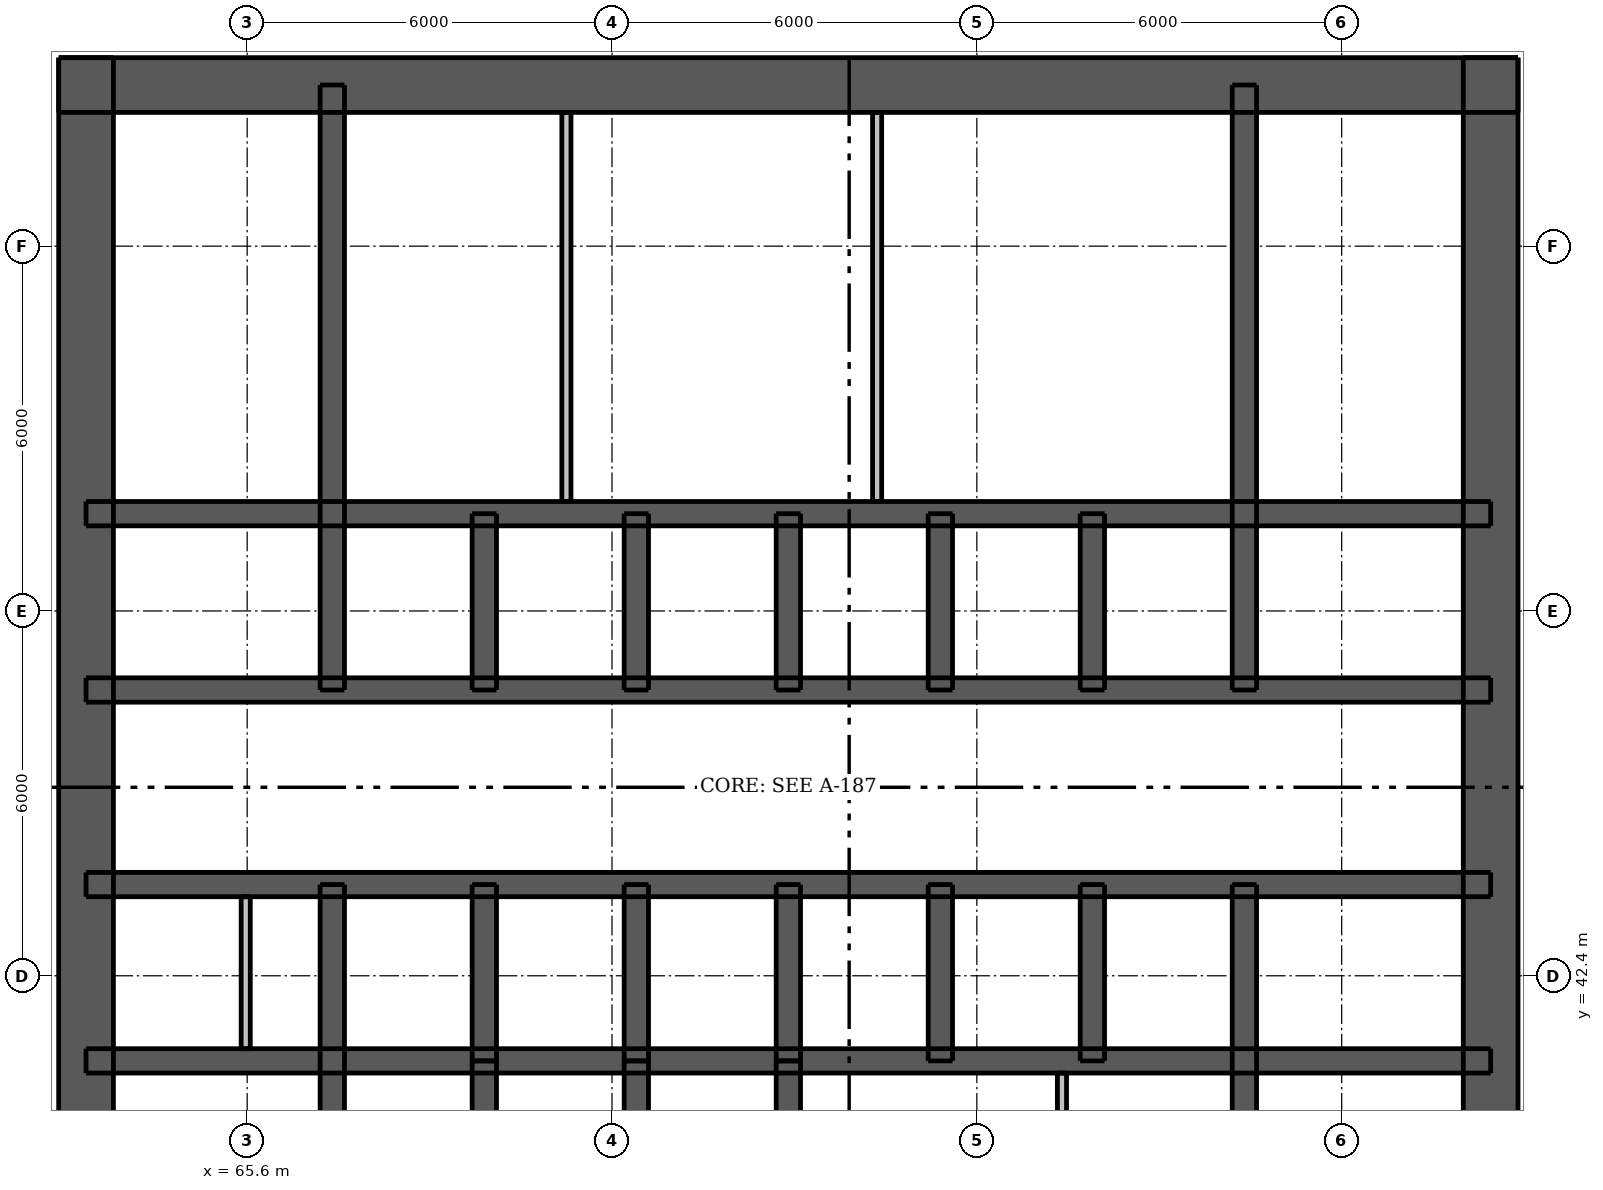
"""IFC4 building model, lengths in metres.
Left out: names, types, materials, properties, quantities, classifications, styles, units other than length and angle.
Written with IfcOpenShell. Run it as: python <this file> out.ifc"""

import sys

from ifc_helpers import new_model, si_unit, direction, frame, frame_2d, origin, place, context, subcontext, project, spatial, rectangle, extrude, element, fill, save


model = new_model("IFC4")
c1 = context("Model", 3, precision=1e-05, world=origin(), true_north=direction((0.0, 1.0)))
c2 = subcontext(c1, "Body", "Model", "MODEL_VIEW")
j1 = project(units=[si_unit("LENGTHUNIT", "METRE"), si_unit("PLANEANGLEUNIT", "RADIAN")], contexts=[c1])
p1 = place(None, origin())
s1 = spatial("IfcSite", under=j1, at=p1, CompositionType="ELEMENT")
p2 = place(p1, origin())
s2 = spatial("IfcBuilding", under=s1, at=p2, CompositionType="ELEMENT")
p3 = place(p2, frame((0.0, 0.0, 49.9)))
s3 = spatial("IfcBuildingStorey", under=s2, at=p3, CompositionType="ELEMENT", Elevation=49.9)
p4 = place(p3, frame((62.5, 57.05, 0.0), z_axis=(0.0, 0.0, 1.0), x_axis=(1.0, 0.0, 0.0)))
e1 = element("IfcWall", 1, at=p4, inside=s3, PredefinedType="SHEAR", context=c2, shape_type="SweptSolid", body=[
    extrude(rectangle(XDim=24.0, YDim=0.9, at=frame_2d((12.0, 0.0))), origin(), (0.0, 0.0, 1.0), 3.05),
])
p5 = place(p4, frame((20.85, 0.0, 0.0)))
e2 = element("IfcOpeningElement", 2, at=p5, cuts=e1, PredefinedType="OPENING", context=c2, shape_type="SweptSolid", body=[
    extrude(rectangle(XDim=1.1, YDim=2.1, at=frame_2d((0.55, 1.05))), frame((0.0, 0.46, 0.0), z_axis=(0.0, -1.0, 0.0), x_axis=(1.0, 0.0, 0.0)), (0.0, 0.0, 1.0), 0.92),
])
p6 = place(p4, frame((2.05, 0.0, 0.0)))
e3 = element("IfcOpeningElement", 3, at=p6, cuts=e1, PredefinedType="OPENING", context=c2, shape_type="SweptSolid", body=[
    extrude(rectangle(XDim=1.1, YDim=2.1, at=frame_2d((0.55, 1.05))), frame((0.0, 0.46, 0.0), z_axis=(0.0, -1.0, 0.0), x_axis=(1.0, 0.0, 0.0)), (0.0, 0.0, 1.0), 0.92),
])
p7 = place(p4, frame((6.075, 0.0, 0.0)))
e4 = element("IfcOpeningElement", 4, at=p7, cuts=e1, PredefinedType="OPENING", context=c2, shape_type="SweptSolid", body=[
    extrude(rectangle(XDim=0.9, YDim=2.1, at=frame_2d((0.45, 1.05))), frame((0.0, 0.46, 0.0), z_axis=(0.0, -1.0, 0.0), x_axis=(1.0, 0.0, 0.0)), (0.0, 0.0, 1.0), 0.92),
])
p8 = place(p4, frame((10.455, 0.0, 0.0)))
e5 = element("IfcOpeningElement", 5, at=p8, cuts=e1, PredefinedType="OPENING", context=c2, shape_type="SweptSolid", body=[
    extrude(rectangle(XDim=0.9, YDim=2.1, at=frame_2d((0.45, 1.05))), frame((0.0, 0.46, 0.0), z_axis=(0.0, -1.0, 0.0), x_axis=(1.0, 0.0, 0.0)), (0.0, 0.0, 1.0), 0.92),
])
p9 = place(p4, frame((15.93, 0.0, 0.0)))
e6 = element("IfcOpeningElement", 6, at=p9, cuts=e1, PredefinedType="OPENING", context=c2, shape_type="SweptSolid", body=[
    extrude(rectangle(XDim=0.9, YDim=2.1, at=frame_2d((0.45, 1.05))), frame((0.0, 0.46, 0.0), z_axis=(0.0, -1.0, 0.0), x_axis=(1.0, 0.0, 0.0)), (0.0, 0.0, 1.0), 0.92),
])
p10 = place(p3, frame((62.95, 33.5, 0.0), z_axis=(0.0, 0.0, 1.0), x_axis=(0.0, 1.0, 0.0)))
e7 = element("IfcWall", 7, at=p10, inside=s3, PredefinedType="SHEAR", context=c2, shape_type="SweptSolid", body=[
    extrude(rectangle(XDim=24.0, YDim=0.9, at=frame_2d((12.0, 0.0))), origin(), (0.0, 0.0, 1.0), 3.05),
])
p11 = place(p10, frame((11.2, 0.0, 0.0)))
e8 = element("IfcOpeningElement", 8, at=p11, cuts=e7, PredefinedType="OPENING", context=c2, shape_type="SweptSolid", body=[
    extrude(rectangle(XDim=1.6, YDim=2.1, at=frame_2d((0.8, 1.05))), frame((0.0, 0.46, 0.0), z_axis=(0.0, -1.0, 0.0), x_axis=(1.0, 0.0, 0.0)), (0.0, 0.0, 1.0), 0.92),
])
p12 = place(p3, frame((86.05, 33.5, 0.0), z_axis=(0.0, 0.0, 1.0), x_axis=(0.0, 1.0, 0.0)))
e9 = element("IfcWall", 9, at=p12, inside=s3, PredefinedType="SHEAR", context=c2, shape_type="SweptSolid", body=[
    extrude(rectangle(XDim=24.0, YDim=0.9, at=frame_2d((12.0, 0.0))), origin(), (0.0, 0.0, 1.0), 3.05),
])
p13 = place(p12, frame((11.2, 0.0, 0.0)))
e10 = element("IfcOpeningElement", 10, at=p13, cuts=e9, PredefinedType="OPENING", context=c2, shape_type="SweptSolid", body=[
    extrude(rectangle(XDim=1.6, YDim=2.1, at=frame_2d((0.8, 1.05))), frame((0.0, 0.46, 0.0), z_axis=(0.0, -1.0, 0.0), x_axis=(1.0, 0.0, 0.0)), (0.0, 0.0, 1.0), 0.92),
])
p14 = place(p3, frame((62.95, 41.0, 0.0), z_axis=(0.0, 0.0, 1.0), x_axis=(1.0, 0.0, 0.0)))
e11 = element("IfcWall", 11, at=p14, inside=s3, PredefinedType="SHEAR", context=c2, shape_type="SweptSolid", body=[
    extrude(rectangle(XDim=23.1, YDim=0.4, at=frame_2d((11.55, 0.0))), origin(), (0.0, 0.0, 1.0), 3.05),
])
p15 = place(p3, frame((62.95, 43.9, 0.0), z_axis=(0.0, 0.0, 1.0), x_axis=(1.0, 0.0, 0.0)))
e12 = element("IfcWall", 12, at=p15, inside=s3, PredefinedType="SHEAR", context=c2, shape_type="SweptSolid", body=[
    extrude(rectangle(XDim=23.1, YDim=0.4, at=frame_2d((11.55, 0.0))), origin(), (0.0, 0.0, 1.0), 3.05),
])
p16 = place(p15, frame((1.088, 0.0, 0.0)))
e13 = element("IfcOpeningElement", 13, at=p16, cuts=e12, PredefinedType="OPENING", context=c2, shape_type="SweptSolid", body=[
    extrude(rectangle(XDim=0.9, YDim=2.1, at=frame_2d((0.45, 1.05))), frame((0.0, 0.21, 0.0), z_axis=(0.0, -1.0, 0.0), x_axis=(1.0, 0.0, 0.0)), (0.0, 0.0, 1.0), 0.42),
])
p17 = place(p15, frame((2.838, 0.0, 0.0)))
e14 = element("IfcOpeningElement", 14, at=p17, cuts=e12, PredefinedType="OPENING", context=c2, shape_type="SweptSolid", body=[
    extrude(rectangle(XDim=0.8, YDim=2.1, at=frame_2d((0.4, 1.05))), frame((0.0, 0.21, 0.0), z_axis=(0.0, -1.0, 0.0), x_axis=(1.0, 0.0, 0.0)), (0.0, 0.0, 1.0), 0.42),
])
p18 = place(p15, frame((20.5, 0.0, 0.0)))
e15 = element("IfcOpeningElement", 15, at=p18, cuts=e12, PredefinedType="OPENING", context=c2, shape_type="SweptSolid", body=[
    extrude(rectangle(XDim=0.9, YDim=2.1, at=frame_2d((0.45, 1.05))), frame((0.0, 0.21, 0.0), z_axis=(0.0, -1.0, 0.0), x_axis=(1.0, 0.0, 0.0)), (0.0, 0.0, 1.0), 0.42),
])
p19 = place(p15, frame((4.75, 0.0, 0.0)))
e16 = element("IfcOpeningElement", 16, at=p19, cuts=e12, PredefinedType="OPENING", context=c2, shape_type="SweptSolid", body=[
    extrude(rectangle(XDim=1.1, YDim=2.1, at=frame_2d((0.55, 1.05))), frame((0.0, 0.21, 0.0), z_axis=(0.0, -1.0, 0.0), x_axis=(1.0, 0.0, 0.0)), (0.0, 0.0, 1.0), 0.42),
])
p20 = place(p15, frame((7.25, 0.0, 0.0)))
e17 = element("IfcOpeningElement", 17, at=p20, cuts=e12, PredefinedType="OPENING", context=c2, shape_type="SweptSolid", body=[
    extrude(rectangle(XDim=1.1, YDim=2.1, at=frame_2d((0.55, 1.05))), frame((0.0, 0.21, 0.0), z_axis=(0.0, -1.0, 0.0), x_axis=(1.0, 0.0, 0.0)), (0.0, 0.0, 1.0), 0.42),
])
p21 = place(p15, frame((9.75, 0.0, 0.0)))
e18 = element("IfcOpeningElement", 18, at=p21, cuts=e12, PredefinedType="OPENING", context=c2, shape_type="SweptSolid", body=[
    extrude(rectangle(XDim=1.1, YDim=2.1, at=frame_2d((0.55, 1.05))), frame((0.0, 0.21, 0.0), z_axis=(0.0, -1.0, 0.0), x_axis=(1.0, 0.0, 0.0)), (0.0, 0.0, 1.0), 0.42),
])
p22 = place(p15, frame((12.25, 0.0, 0.0)))
e19 = element("IfcOpeningElement", 19, at=p22, cuts=e12, PredefinedType="OPENING", context=c2, shape_type="SweptSolid", body=[
    extrude(rectangle(XDim=1.1, YDim=2.1, at=frame_2d((0.55, 1.05))), frame((0.0, 0.21, 0.0), z_axis=(0.0, -1.0, 0.0), x_axis=(1.0, 0.0, 0.0)), (0.0, 0.0, 1.0), 0.42),
])
p23 = place(p15, frame((14.75, 0.0, 0.0)))
e20 = element("IfcOpeningElement", 20, at=p23, cuts=e12, PredefinedType="OPENING", context=c2, shape_type="SweptSolid", body=[
    extrude(rectangle(XDim=1.1, YDim=2.1, at=frame_2d((0.55, 1.05))), frame((0.0, 0.21, 0.0), z_axis=(0.0, -1.0, 0.0), x_axis=(1.0, 0.0, 0.0)), (0.0, 0.0, 1.0), 0.42),
])
p24 = place(p15, frame((17.25, 0.0, 0.0)))
e21 = element("IfcOpeningElement", 21, at=p24, cuts=e12, PredefinedType="OPENING", context=c2, shape_type="SweptSolid", body=[
    extrude(rectangle(XDim=1.1, YDim=2.1, at=frame_2d((0.55, 1.05))), frame((0.0, 0.21, 0.0), z_axis=(0.0, -1.0, 0.0), x_axis=(1.0, 0.0, 0.0)), (0.0, 0.0, 1.0), 0.42),
])
p25 = place(p3, frame((62.95, 47.1, 0.0), z_axis=(0.0, 0.0, 1.0), x_axis=(1.0, 0.0, 0.0)))
e22 = element("IfcWall", 22, at=p25, inside=s3, PredefinedType="SHEAR", context=c2, shape_type="SweptSolid", body=[
    extrude(rectangle(XDim=23.1, YDim=0.4, at=frame_2d((11.55, 0.0))), origin(), (0.0, 0.0, 1.0), 3.05),
])
p26 = place(p25, frame((1.7, 0.0, 0.0)))
e23 = element("IfcOpeningElement", 23, at=p26, cuts=e22, PredefinedType="OPENING", context=c2, shape_type="SweptSolid", body=[
    extrude(rectangle(XDim=0.9, YDim=2.1, at=frame_2d((0.45, 1.05))), frame((0.0, 0.21, 0.0), z_axis=(0.0, -1.0, 0.0), x_axis=(1.0, 0.0, 0.0)), (0.0, 0.0, 1.0), 0.42),
])
p27 = place(p25, frame((20.5, 0.0, 0.0)))
e24 = element("IfcOpeningElement", 24, at=p27, cuts=e22, PredefinedType="OPENING", context=c2, shape_type="SweptSolid", body=[
    extrude(rectangle(XDim=0.9, YDim=2.1, at=frame_2d((0.45, 1.05))), frame((0.0, 0.21, 0.0), z_axis=(0.0, -1.0, 0.0), x_axis=(1.0, 0.0, 0.0)), (0.0, 0.0, 1.0), 0.42),
])
p28 = place(p3, frame((62.95, 50.0, 0.0), z_axis=(0.0, 0.0, 1.0), x_axis=(1.0, 0.0, 0.0)))
e25 = element("IfcWall", 25, at=p28, inside=s3, PredefinedType="SHEAR", context=c2, shape_type="SweptSolid", body=[
    extrude(rectangle(XDim=23.1, YDim=0.4, at=frame_2d((11.55, 0.0))), origin(), (0.0, 0.0, 1.0), 3.05),
])
p29 = place(p3, frame((67.0, 33.95, 0.0), z_axis=(0.0, 0.0, 1.0), x_axis=(0.0, 1.0, 0.0)))
e26 = element("IfcWall", 26, at=p29, inside=s3, PredefinedType="SHEAR", context=c2, shape_type="SweptSolid", body=[
    extrude(rectangle(XDim=9.95, YDim=0.4, at=frame_2d((4.975, 0.0))), origin(), (0.0, 0.0, 1.0), 3.05),
])
p30 = place(p29, frame((0.65, 0.0, 0.0)))
e27 = element("IfcOpeningElement", 27, at=p30, cuts=e26, PredefinedType="OPENING", context=c2, shape_type="SweptSolid", body=[
    extrude(rectangle(XDim=1.1, YDim=2.1, at=frame_2d((0.55, 1.05))), frame((0.0, 0.21, 0.0), z_axis=(0.0, -1.0, 0.0), x_axis=(1.0, 0.0, 0.0)), (0.0, 0.0, 1.0), 0.42),
])
for number, where, z_axis, x_axis in (
    (28, (67.0, 47.1, 0.0), (0.0, 0.0, 1.0), (0.0, 1.0, 0.0)),
    (29, (82.0, 33.95, 0.0), (0.0, 0.0, 1.0), (0.0, 1.0, 0.0)),
    (30, (82.0, 47.1, 0.0), (0.0, 0.0, 1.0), (0.0, 1.0, 0.0)),
):
    element("IfcWall", number, at=place(p3, frame(where, z_axis=z_axis, x_axis=x_axis)), inside=s3, PredefinedType="SHEAR", context=c2, shape_type="SweptSolid", body=[
        extrude(rectangle(XDim=9.95, YDim=0.4, at=frame_2d((4.975, 0.0))), origin(), (0.0, 0.0, 1.0), 3.05),
    ])
for number, where, z_axis, x_axis in (
    (31, (69.5, 41.0, 0.0), (0.0, 0.0, 1.0), (0.0, 1.0, 0.0)),
    (32, (69.5, 47.1, 0.0), (0.0, 0.0, 1.0), (0.0, 1.0, 0.0)),
    (33, (72.0, 41.0, 0.0), (0.0, 0.0, 1.0), (0.0, 1.0, 0.0)),
    (34, (72.0, 47.1, 0.0), (0.0, 0.0, 1.0), (0.0, 1.0, 0.0)),
    (35, (74.5, 41.0, 0.0), (0.0, 0.0, 1.0), (0.0, 1.0, 0.0)),
    (36, (74.5, 47.1, 0.0), (0.0, 0.0, 1.0), (0.0, 1.0, 0.0)),
    (37, (77.0, 41.0, 0.0), (0.0, 0.0, 1.0), (0.0, 1.0, 0.0)),
    (38, (77.0, 47.1, 0.0), (0.0, 0.0, 1.0), (0.0, 1.0, 0.0)),
    (39, (79.5, 41.0, 0.0), (0.0, 0.0, 1.0), (0.0, 1.0, 0.0)),
    (40, (79.5, 47.1, 0.0), (0.0, 0.0, 1.0), (0.0, 1.0, 0.0)),
    (41, (69.5, 38.1, 0.0), (0.0, 0.0, 1.0), (0.0, 1.0, 0.0)),
    (42, (72.0, 38.1, 0.0), (0.0, 0.0, 1.0), (0.0, 1.0, 0.0)),
    (43, (74.5, 38.1, 0.0), (0.0, 0.0, 1.0), (0.0, 1.0, 0.0)),
):
    element("IfcWall", number, at=place(p3, frame(where, z_axis=z_axis, x_axis=x_axis)), inside=s3, PredefinedType="SHEAR", context=c2, shape_type="SweptSolid", body=[
        extrude(rectangle(XDim=2.9, YDim=0.4, at=frame_2d((1.45, 0.0))), origin(), (0.0, 0.0, 1.0), 3.05),
    ])
p31 = place(p3, frame((79.0, 34.4, 0.0), z_axis=(0.0, 0.0, 1.0), x_axis=(0.0, 1.0, 0.0)))
e44 = element("IfcWall", 44, at=p31, inside=s3, PredefinedType="PLUMBINGWALL", context=c2, shape_type="SweptSolid", body=[
    extrude(rectangle(XDim=6.4, YDim=0.15, at=frame_2d((3.2, 0.0))), origin(), (0.0, 0.0, 1.0), 3.05),
])
p32 = place(p3, frame((65.576, 41.2, 0.0), z_axis=(0.0, 0.0, 1.0), x_axis=(0.0, 1.0, 0.0)))
e45 = element("IfcWall", 45, at=p32, inside=s3, PredefinedType="PLUMBINGWALL", context=c2, shape_type="SweptSolid", body=[
    extrude(rectangle(XDim=2.5, YDim=0.15, at=frame_2d((1.25, 0.0))), origin(), (0.0, 0.0, 1.0), 3.05),
])
for number, where, z_axis, x_axis in (
    (46, (70.85, 50.2, 0.0), (0.0, 0.0, 1.0), (0.0, 1.0, 0.0)),
    (47, (75.96, 50.2, 0.0), (0.0, 0.0, 1.0), (0.0, 1.0, 0.0)),
):
    element("IfcWall", number, at=place(p3, frame(where, z_axis=z_axis, x_axis=x_axis)), inside=s3, PredefinedType="PLUMBINGWALL", context=c2, shape_type="SweptSolid", body=[
        extrude(rectangle(XDim=6.4, YDim=0.15, at=frame_2d((3.2, 0.0))), origin(), (0.0, 0.0, 1.0), 3.05),
    ])
p33 = place(p5, origin())
e48 = element("IfcDoor", 48, at=p33, inside=s3, OperationType="SINGLE_SWING_RIGHT", PredefinedType="DOOR", context=c2, shape_type="SweptSolid", body=[
    extrude(rectangle(XDim=1.1, YDim=2.1, at=frame_2d((0.55, 1.05))), frame((0.0, -0.388, 0.0), z_axis=(0.0, -1.0, 0.0), x_axis=(1.0, 0.0, 0.0)), (0.0, 0.0, 1.0), 0.05),
])
fill(e2, e48)
p34 = place(p6, origin())
e49 = element("IfcDoor", 49, at=p34, inside=s3, OperationType="SINGLE_SWING_LEFT", PredefinedType="DOOR", context=c2, shape_type="SweptSolid", body=[
    extrude(rectangle(XDim=1.1, YDim=2.1, at=frame_2d((0.55, 1.05))), frame((0.0, -0.388, 0.0), z_axis=(0.0, -1.0, 0.0), x_axis=(1.0, 0.0, 0.0)), (0.0, 0.0, 1.0), 0.05),
])
fill(e3, e49)
p35 = place(p11, origin())
e50 = element("IfcDoor", 50, at=p35, inside=s3, OperationType="DOUBLE_DOOR_SINGLE_SWING", PredefinedType="DOOR", context=c2, shape_type="SweptSolid", body=[
    extrude(rectangle(XDim=1.6, YDim=2.1, at=frame_2d((0.8, 1.05))), frame((0.0, -0.388, 0.0), z_axis=(0.0, -1.0, 0.0), x_axis=(1.0, 0.0, 0.0)), (0.0, 0.0, 1.0), 0.05),
])
fill(e8, e50)
p36 = place(p13, origin())
e51 = element("IfcDoor", 51, at=p36, inside=s3, OperationType="DOUBLE_DOOR_SINGLE_SWING", PredefinedType="DOOR", context=c2, shape_type="SweptSolid", body=[
    extrude(rectangle(XDim=1.6, YDim=2.1, at=frame_2d((0.8, 1.05))), frame((0.0, 0.438, 0.0), z_axis=(0.0, -1.0, 0.0), x_axis=(1.0, 0.0, 0.0)), (0.0, 0.0, 1.0), 0.05),
])
fill(e10, e51)
p37 = place(p16, origin())
e52 = element("IfcDoor", 52, at=p37, inside=s3, OperationType="SINGLE_SWING_LEFT", PredefinedType="DOOR", context=c2, shape_type="SweptSolid", body=[
    extrude(rectangle(XDim=0.9, YDim=2.1, at=frame_2d((0.45, 1.05))), frame((0.0, -0.138, 0.0), z_axis=(0.0, -1.0, 0.0), x_axis=(1.0, 0.0, 0.0)), (0.0, 0.0, 1.0), 0.05),
])
fill(e13, e52)
p38 = place(p17, origin())
e53 = element("IfcDoor", 53, at=p38, inside=s3, OperationType="SINGLE_SWING_RIGHT", PredefinedType="DOOR", context=c2, shape_type="SweptSolid", body=[
    extrude(rectangle(XDim=0.8, YDim=2.1, at=frame_2d((0.4, 1.05))), frame((0.0, -0.138, 0.0), z_axis=(0.0, -1.0, 0.0), x_axis=(1.0, 0.0, 0.0)), (0.0, 0.0, 1.0), 0.05),
])
fill(e14, e53)
p39 = place(p18, origin())
e54 = element("IfcDoor", 54, at=p39, inside=s3, OperationType="SINGLE_SWING_LEFT", PredefinedType="DOOR", context=c2, shape_type="SweptSolid", body=[
    extrude(rectangle(XDim=0.9, YDim=2.1, at=frame_2d((0.45, 1.05))), frame((0.0, -0.138, 0.0), z_axis=(0.0, -1.0, 0.0), x_axis=(1.0, 0.0, 0.0)), (0.0, 0.0, 1.0), 0.05),
])
fill(e15, e54)
p40 = place(p26, origin())
e55 = element("IfcDoor", 55, at=p40, inside=s3, OperationType="SINGLE_SWING_LEFT", PredefinedType="DOOR", context=c2, shape_type="SweptSolid", body=[
    extrude(rectangle(XDim=0.9, YDim=2.1, at=frame_2d((0.45, 1.05))), frame((0.0, 0.188, 0.0), z_axis=(0.0, -1.0, 0.0), x_axis=(1.0, 0.0, 0.0)), (0.0, 0.0, 1.0), 0.05),
])
fill(e23, e55)
p41 = place(p27, origin())
e56 = element("IfcDoor", 56, at=p41, inside=s3, OperationType="SINGLE_SWING_LEFT", PredefinedType="DOOR", context=c2, shape_type="SweptSolid", body=[
    extrude(rectangle(XDim=0.9, YDim=2.1, at=frame_2d((0.45, 1.05))), frame((0.0, 0.188, 0.0), z_axis=(0.0, -1.0, 0.0), x_axis=(1.0, 0.0, 0.0)), (0.0, 0.0, 1.0), 0.05),
])
fill(e24, e56)
p42 = place(p7, origin())
e57 = element("IfcDoor", 57, at=p42, inside=s3, OperationType="SINGLE_SWING_RIGHT", PredefinedType="DOOR", context=c2, shape_type="SweptSolid", body=[
    extrude(rectangle(XDim=0.9, YDim=2.1, at=frame_2d((0.45, 1.05))), frame((0.0, -0.388, 0.0), z_axis=(0.0, -1.0, 0.0), x_axis=(1.0, 0.0, 0.0)), (0.0, 0.0, 1.0), 0.05),
])
fill(e4, e57)
p43 = place(p8, origin())
e58 = element("IfcDoor", 58, at=p43, inside=s3, OperationType="SINGLE_SWING_RIGHT", PredefinedType="DOOR", context=c2, shape_type="SweptSolid", body=[
    extrude(rectangle(XDim=0.9, YDim=2.1, at=frame_2d((0.45, 1.05))), frame((0.0, -0.388, 0.0), z_axis=(0.0, -1.0, 0.0), x_axis=(1.0, 0.0, 0.0)), (0.0, 0.0, 1.0), 0.05),
])
fill(e5, e58)
p44 = place(p9, origin())
e59 = element("IfcDoor", 59, at=p44, inside=s3, OperationType="SINGLE_SWING_RIGHT", PredefinedType="DOOR", context=c2, shape_type="SweptSolid", body=[
    extrude(rectangle(XDim=0.9, YDim=2.1, at=frame_2d((0.45, 1.05))), frame((0.0, -0.388, 0.0), z_axis=(0.0, -1.0, 0.0), x_axis=(1.0, 0.0, 0.0)), (0.0, 0.0, 1.0), 0.05),
])
fill(e6, e59)
p45 = place(p19, origin())
e60 = element("IfcDoor", 60, at=p45, inside=s3, OperationType="DOUBLE_DOOR_SLIDING", PredefinedType="DOOR", context=c2, shape_type="SweptSolid", body=[
    extrude(rectangle(XDim=1.1, YDim=2.1, at=frame_2d((0.55, 1.05))), frame((0.0, 0.025, 0.0), z_axis=(0.0, -1.0, 0.0), x_axis=(1.0, 0.0, 0.0)), (0.0, 0.0, 1.0), 0.05),
])
fill(e16, e60)
p46 = place(p20, origin())
e61 = element("IfcDoor", 61, at=p46, inside=s3, OperationType="DOUBLE_DOOR_SLIDING", PredefinedType="DOOR", context=c2, shape_type="SweptSolid", body=[
    extrude(rectangle(XDim=1.1, YDim=2.1, at=frame_2d((0.55, 1.05))), frame((0.0, 0.025, 0.0), z_axis=(0.0, -1.0, 0.0), x_axis=(1.0, 0.0, 0.0)), (0.0, 0.0, 1.0), 0.05),
])
fill(e17, e61)
p47 = place(p21, origin())
e62 = element("IfcDoor", 62, at=p47, inside=s3, OperationType="DOUBLE_DOOR_SLIDING", PredefinedType="DOOR", context=c2, shape_type="SweptSolid", body=[
    extrude(rectangle(XDim=1.1, YDim=2.1, at=frame_2d((0.55, 1.05))), frame((0.0, 0.025, 0.0), z_axis=(0.0, -1.0, 0.0), x_axis=(1.0, 0.0, 0.0)), (0.0, 0.0, 1.0), 0.05),
])
fill(e18, e62)
p48 = place(p22, origin())
e63 = element("IfcDoor", 63, at=p48, inside=s3, OperationType="DOUBLE_DOOR_SLIDING", PredefinedType="DOOR", context=c2, shape_type="SweptSolid", body=[
    extrude(rectangle(XDim=1.1, YDim=2.1, at=frame_2d((0.55, 1.05))), frame((0.0, 0.025, 0.0), z_axis=(0.0, -1.0, 0.0), x_axis=(1.0, 0.0, 0.0)), (0.0, 0.0, 1.0), 0.05),
])
fill(e19, e63)
p49 = place(p23, origin())
e64 = element("IfcDoor", 64, at=p49, inside=s3, OperationType="DOUBLE_DOOR_SLIDING", PredefinedType="DOOR", context=c2, shape_type="SweptSolid", body=[
    extrude(rectangle(XDim=1.1, YDim=2.1, at=frame_2d((0.55, 1.05))), frame((0.0, 0.025, 0.0), z_axis=(0.0, -1.0, 0.0), x_axis=(1.0, 0.0, 0.0)), (0.0, 0.0, 1.0), 0.05),
])
fill(e20, e64)
p50 = place(p24, origin())
e65 = element("IfcDoor", 65, at=p50, inside=s3, OperationType="DOUBLE_DOOR_SLIDING", PredefinedType="DOOR", context=c2, shape_type="SweptSolid", body=[
    extrude(rectangle(XDim=1.1, YDim=2.1, at=frame_2d((0.55, 1.05))), frame((0.0, 0.025, 0.0), z_axis=(0.0, -1.0, 0.0), x_axis=(1.0, 0.0, 0.0)), (0.0, 0.0, 1.0), 0.05),
])
fill(e21, e65)
save(model, sys.argv[1])
